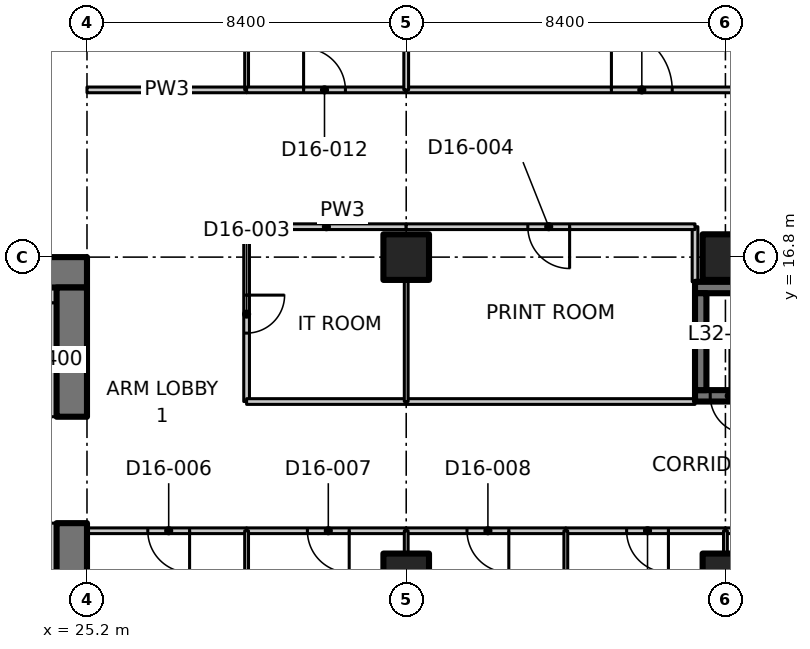
"""IFC4 building model, lengths in metres.
Left out: names, types, materials, properties, quantities, classifications, styles, units other than length and angle.
Written with IfcOpenShell. Run it as: python <this file> out.ifc"""

import sys

from ifc_helpers import new_model, si_unit, direction, frame, frame_2d, origin, origin_2d, place, context, subcontext, project, spatial, polyline, rectangle, outline, extrude, element, fill, save


model = new_model("IFC4")
c1 = context("Model", 3, precision=1e-05, world=origin(), true_north=direction((0.0, 1.0)))
c2 = subcontext(c1, "Body", "Model", "MODEL_VIEW")
j1 = project(units=[si_unit("LENGTHUNIT", "METRE"), si_unit("PLANEANGLEUNIT", "RADIAN")], contexts=[c1])
p1 = place(None, origin())
s1 = spatial("IfcSite", under=j1, at=p1, CompositionType="ELEMENT")
p2 = place(p1, origin())
s2 = spatial("IfcBuilding", under=s1, at=p2, CompositionType="ELEMENT")
p3 = place(p2, frame((0.0, 0.0, 131.3)))
s3 = spatial("IfcBuildingStorey", under=s2, at=p3, CompositionType="ELEMENT", Elevation=131.3)
for number, where, z_axis, x_axis in (
    (1, (33.6, 8.4, 0.0), (0.0, 0.0, 1.0), (1.0, 0.0, 0.0)),
    (2, (33.6, 16.8, 0.0), (0.0, 0.0, 1.0), (1.0, 0.0, 0.0)),
    (3, (42.0, 8.4, 0.0), (0.0, 0.0, 1.0), (1.0, 0.0, 0.0)),
    (4, (42.0, 16.8, 0.0), (0.0, 0.0, 1.0), (1.0, 0.0, 0.0)),
):
    element("IfcColumn", number, at=place(p3, frame(where, z_axis=z_axis, x_axis=x_axis)), inside=s3, PredefinedType="COLUMN", context=c2, shape_type="SweptSolid", body=[
        extrude(rectangle(XDim=1.2, YDim=1.2, at=origin_2d()), origin(), (0.0, 0.0, 1.0), 3.35),
    ])
p4 = place(p3, frame((23.8, 16.4, 0.0), z_axis=(0.0, 0.0, 1.0), x_axis=(1.0, 0.0, 0.0)))
e5 = element("IfcWall", 5, at=p4, inside=s3, PredefinedType="SHEAR", context=c2, shape_type="SweptSolid", body=[
    extrude(rectangle(XDim=1.4, YDim=0.8, at=frame_2d((0.7, 0.0))), origin(), (0.0, 0.0, 1.0), 3.35),
])
p5 = place(p3, frame((24.8, 0.8, 0.0), z_axis=(0.0, 0.0, 1.0), x_axis=(0.0, 1.0, 0.0)))
e6 = element("IfcWall", 6, at=p5, inside=s3, PredefinedType="SHEAR", context=c2, shape_type="SweptSolid", body=[
    extrude(rectangle(XDim=9.0, YDim=0.8, at=frame_2d((4.5, 0.0))), origin(), (0.0, 0.0, 1.0), 3.35),
])
p6 = place(p3, frame((24.8, 12.6, 0.0), z_axis=(0.0, 0.0, 1.0), x_axis=(0.0, 1.0, 0.0)))
e7 = element("IfcWall", 7, at=p6, inside=s3, PredefinedType="SHEAR", context=c2, shape_type="SweptSolid", body=[
    extrude(rectangle(XDim=3.4, YDim=0.8, at=frame_2d((1.7, 0.0))), origin(), (0.0, 0.0, 1.0), 3.35),
])
p7 = place(p3, frame((24.2, 12.6, 0.0), z_axis=(0.0, 0.0, 1.0), x_axis=(0.0, 1.0, 0.0)))
e8 = element("IfcWall", 8, at=p7, inside=s3, PredefinedType="PARTITIONING", context=c2, shape_type="SweptSolid", body=[
    extrude(rectangle(XDim=3.0, YDim=0.4, at=frame_2d((1.5, 0.0))), origin(), (0.0, 0.0, 1.0), 3.35),
])
p8 = place(p3, frame((23.8, 15.8, 0.0), z_axis=(0.0, 0.0, 1.0), x_axis=(1.0, 0.0, 0.0)))
e9 = element("IfcWall", 9, at=p8, inside=s3, PredefinedType="PARTITIONING", context=c2, shape_type="SweptSolid", body=[
    extrude(rectangle(XDim=0.6, YDim=0.4, at=frame_2d((0.3, 0.0))), origin(), (0.0, 0.0, 1.0), 3.35),
])
p9 = place(p3, frame((49.4, 13.15, 0.0), z_axis=(0.0, 0.0, 1.0), x_axis=(-1.0, 0.0, 0.0)))
e10 = element("IfcWall", 10, at=p9, inside=s3, PredefinedType="SHEAR", context=c2, shape_type="SweptSolid", body=[
    extrude(rectangle(XDim=8.2, YDim=0.3, at=frame_2d((4.1, 0.0))), origin(), (0.0, 0.0, 1.0), 3.35),
])
p10 = place(p9, frame((6.8, 0.0, 0.0)))
e11 = element("IfcOpeningElement", 11, at=p10, cuts=e10, PredefinedType="OPENING", context=c2, shape_type="SweptSolid", body=[
    extrude(rectangle(XDim=1.0, YDim=2.1, at=frame_2d((0.5, 1.05))), frame((0.0, 0.16, 0.0), z_axis=(0.0, -1.0, 0.0), x_axis=(1.0, 0.0, 0.0)), (0.0, 0.0, 1.0), 0.32),
])
p11 = place(p3, frame((41.2, 16.0, 0.0), z_axis=(0.0, 0.0, 1.0), x_axis=(1.0, 0.0, 0.0)))
e12 = element("IfcWall", 12, at=p11, inside=s3, PredefinedType="SHEAR", context=c2, shape_type="SweptSolid", body=[
    extrude(rectangle(XDim=8.2, YDim=0.3, at=frame_2d((4.1, 0.0))), origin(), (0.0, 0.0, 1.0), 3.35),
])
p12 = place(p3, frame((41.35, 13.3, 0.0), z_axis=(0.0, 0.0, 1.0), x_axis=(0.0, 1.0, 0.0)))
e13 = element("IfcWall", 13, at=p12, inside=s3, PredefinedType="SHEAR", context=c2, shape_type="SweptSolid", body=[
    extrude(rectangle(XDim=2.55, YDim=0.3, at=frame_2d((1.275, 0.0))), origin(), (0.0, 0.0, 1.0), 3.35),
])
p13 = place(p3, frame((24.2, 4.35, 0.0), z_axis=(0.0, 0.0, 1.0), x_axis=(0.0, 1.0, 0.0)))
e14 = element("IfcWall", 14, at=p13, inside=s3, PredefinedType="PARTITIONING", context=c2, shape_type="SweptSolid", body=[
    extrude(rectangle(XDim=5.45, YDim=0.4, at=frame_2d((2.725, 0.0))), origin(), (0.0, 0.0, 1.0), 3.35),
])
p14 = place(p3, frame((25.2, 21.2, 0.0), z_axis=(0.0, 0.0, 1.0), x_axis=(1.0, 0.0, 0.0)))
e15 = element("IfcWall", 15, at=p14, inside=s3, PredefinedType="PARTITIONING", context=c2, shape_type="SweptSolid", body=[
    extrude(rectangle(XDim=4.2, YDim=0.15, at=frame_2d((2.1, 0.0))), origin(), (0.0, 0.0, 1.0), 3.33),
])
p15 = place(p3, frame((29.4, 17.6, 0.0), z_axis=(0.0, 0.0, 1.0), x_axis=(0.0, -1.0, 0.0)))
e16 = element("IfcWall", 16, at=p15, inside=s3, PredefinedType="PARTITIONING", context=c2, shape_type="SweptSolid", body=[
    extrude(rectangle(XDim=4.6, YDim=0.15, at=frame_2d((2.3, 0.0))), origin(), (0.0, 0.0, 1.0), 3.33),
])
p16 = place(p15, frame((1.8, 0.0, 0.0)))
e17 = element("IfcOpeningElement", 17, at=p16, cuts=e16, PredefinedType="OPENING", context=c2, shape_type="SweptSolid", body=[
    extrude(rectangle(XDim=1.0, YDim=2.1, at=frame_2d((0.5, 1.05))), frame((0.0, 0.085, 0.0), z_axis=(0.0, -1.0, 0.0), x_axis=(1.0, 0.0, 0.0)), (0.0, 0.0, 1.0), 0.17),
])
p17 = place(p3, frame((29.4, 9.6, 0.0), z_axis=(0.0, 0.0, 1.0), x_axis=(-1.0, 0.0, 0.0)))
e18 = element("IfcWall", 18, at=p17, inside=s3, PredefinedType="PARTITIONING", context=c2, shape_type="SweptSolid", body=[
    extrude(rectangle(XDim=4.2, YDim=0.15, at=frame_2d((2.1, 0.0))), origin(), (0.0, 0.0, 1.0), 3.33),
])
p18 = place(p17, frame((1.5, 0.0, 0.0)))
e19 = element("IfcOpeningElement", 19, at=p18, cuts=e18, PredefinedType="OPENING", context=c2, shape_type="SweptSolid", body=[
    extrude(rectangle(XDim=1.1, YDim=2.1, at=frame_2d((0.55, 1.05))), frame((0.0, 0.085, 0.0), z_axis=(0.0, -1.0, 0.0), x_axis=(1.0, 0.0, 0.0)), (0.0, 0.0, 1.0), 0.17),
])
p19 = place(p3, frame((29.4, 27.429, 0.0), z_axis=(0.0, 0.0, 1.0), x_axis=(0.0, -1.0, 0.0)))
e20 = element("IfcWall", 20, at=p19, inside=s3, PredefinedType="PARTITIONING", context=c2, shape_type="SweptSolid", body=[
    extrude(outline(polyline([(0.0, 0.0), (6.229, 0.0), (6.229, 3.33), (2.679, 3.33), (2.677, 2.98), (1.781, 2.98), (1.779, 3.33), (0.154, 3.33), (0.0, 3.33), (0.0, 0.0)])), frame((0.0, 0.05, 0.0), z_axis=(0.0, -1.0, 0.0), x_axis=(1.0, 0.0, 0.0)), (0.0, 0.0, 1.0), 0.1),
])
p20 = place(p3, frame((29.4, 13.0, 0.0), z_axis=(0.0, 0.0, 1.0), x_axis=(1.0, 0.0, 0.0)))
e21 = element("IfcWall", 21, at=p20, inside=s3, PredefinedType="PARTITIONING", context=c2, shape_type="SweptSolid", body=[
    extrude(rectangle(XDim=4.2, YDim=0.15, at=frame_2d((2.1, 0.0))), origin(), (0.0, 0.0, 1.0), 3.33),
])
p21 = place(p3, frame((33.6, 13.0, 0.0), z_axis=(0.0, 0.0, 1.0), x_axis=(1.0, 0.0, 0.0)))
e22 = element("IfcWall", 22, at=p21, inside=s3, PredefinedType="PARTITIONING", context=c2, shape_type="SweptSolid", body=[
    extrude(rectangle(XDim=7.6, YDim=0.15, at=frame_2d((3.8, 0.0))), origin(), (0.0, 0.0, 1.0), 3.33),
])
p22 = place(p3, frame((33.6, 9.6, 0.0), z_axis=(0.0, 0.0, 1.0), x_axis=(-1.0, 0.0, 0.0)))
e23 = element("IfcWall", 23, at=p22, inside=s3, PredefinedType="PARTITIONING", context=c2, shape_type="SweptSolid", body=[
    extrude(rectangle(XDim=4.2, YDim=0.15, at=frame_2d((2.1, 0.0))), origin(), (0.0, 0.0, 1.0), 3.33),
])
p23 = place(p22, frame((1.5, 0.0, 0.0)))
e24 = element("IfcOpeningElement", 24, at=p23, cuts=e23, PredefinedType="OPENING", context=c2, shape_type="SweptSolid", body=[
    extrude(rectangle(XDim=1.1, YDim=2.1, at=frame_2d((0.55, 1.05))), frame((0.0, 0.085, 0.0), z_axis=(0.0, -1.0, 0.0), x_axis=(1.0, 0.0, 0.0)), (0.0, 0.0, 1.0), 0.17),
])
p24 = place(p3, frame((37.8, 9.6, 0.0), z_axis=(0.0, 0.0, 1.0), x_axis=(-1.0, 0.0, 0.0)))
e25 = element("IfcWall", 25, at=p24, inside=s3, PredefinedType="PARTITIONING", context=c2, shape_type="SweptSolid", body=[
    extrude(rectangle(XDim=4.2, YDim=0.15, at=frame_2d((2.1, 0.0))), origin(), (0.0, 0.0, 1.0), 3.33),
])
p25 = place(p24, frame((1.5, 0.0, 0.0)))
e26 = element("IfcOpeningElement", 26, at=p25, cuts=e25, PredefinedType="OPENING", context=c2, shape_type="SweptSolid", body=[
    extrude(rectangle(XDim=1.1, YDim=2.1, at=frame_2d((0.55, 1.05))), frame((0.0, 0.085, 0.0), z_axis=(0.0, -1.0, 0.0), x_axis=(1.0, 0.0, 0.0)), (0.0, 0.0, 1.0), 0.17),
])
p26 = place(p3, frame((42.0, 9.6, 0.0), z_axis=(0.0, 0.0, 1.0), x_axis=(-1.0, 0.0, 0.0)))
e27 = element("IfcWall", 27, at=p26, inside=s3, PredefinedType="PARTITIONING", context=c2, shape_type="SweptSolid", body=[
    extrude(rectangle(XDim=4.2, YDim=0.15, at=frame_2d((2.1, 0.0))), origin(), (0.0, 0.0, 1.0), 3.33),
])
p27 = place(p26, frame((1.5, 0.0, 0.0)))
e28 = element("IfcOpeningElement", 28, at=p27, cuts=e27, PredefinedType="OPENING", context=c2, shape_type="SweptSolid", body=[
    extrude(rectangle(XDim=1.1, YDim=2.1, at=frame_2d((0.55, 1.05))), frame((0.0, 0.085, 0.0), z_axis=(0.0, -1.0, 0.0), x_axis=(1.0, 0.0, 0.0)), (0.0, 0.0, 1.0), 0.17),
])
p28 = place(p3, frame((50.4, 9.6, 0.0), z_axis=(0.0, 0.0, 1.0), x_axis=(-1.0, 0.0, 0.0)))
e29 = element("IfcWall", 29, at=p28, inside=s3, PredefinedType="PARTITIONING", context=c2, shape_type="SweptSolid", body=[
    extrude(rectangle(XDim=8.4, YDim=0.15, at=frame_2d((4.2, 0.0))), origin(), (0.0, 0.0, 1.0), 3.33),
])
p29 = place(p28, frame((3.3, 0.0, 0.0)))
e30 = element("IfcOpeningElement", 30, at=p29, cuts=e29, PredefinedType="OPENING", context=c2, shape_type="SweptSolid", body=[
    extrude(rectangle(XDim=1.6, YDim=2.1, at=frame_2d((0.8, 1.05))), frame((0.0, 0.085, 0.0), z_axis=(0.0, -1.0, 0.0), x_axis=(1.0, 0.0, 0.0)), (0.0, 0.0, 1.0), 0.17),
])
p30 = place(p3, frame((33.6, 17.6, 0.0), z_axis=(0.0, 0.0, 1.0), x_axis=(-1.0, 0.0, 0.0)))
e31 = element("IfcWall", 31, at=p30, inside=s3, PredefinedType="PARTITIONING", context=c2, shape_type="SweptSolid", body=[
    extrude(rectangle(XDim=4.2, YDim=0.15, at=frame_2d((2.1, 0.0))), origin(), (0.0, 0.0, 1.0), 3.33),
])
p31 = place(p3, frame((41.2, 16.15, 0.0), z_axis=(0.0, 0.0, 1.0), x_axis=(0.0, 1.0, 0.0)))
e32 = element("IfcWall", 32, at=p31, inside=s3, PredefinedType="PARTITIONING", context=c2, shape_type="SweptSolid", body=[
    extrude(rectangle(XDim=1.45, YDim=0.15, at=frame_2d((0.725, 0.0))), origin(), (0.0, 0.0, 1.0), 3.33),
])
p32 = place(p3, frame((41.2, 17.6, 0.0), z_axis=(0.0, 0.0, 1.0), x_axis=(-1.0, 0.0, 0.0)))
e33 = element("IfcWall", 33, at=p32, inside=s3, PredefinedType="PARTITIONING", context=c2, shape_type="SweptSolid", body=[
    extrude(rectangle(XDim=7.6, YDim=0.15, at=frame_2d((3.8, 0.0))), origin(), (0.0, 0.0, 1.0), 3.33),
])
p33 = place(p32, frame((3.3, 0.0, 0.0)))
e34 = element("IfcOpeningElement", 34, at=p33, cuts=e33, PredefinedType="OPENING", context=c2, shape_type="SweptSolid", body=[
    extrude(rectangle(XDim=1.1, YDim=2.1, at=frame_2d((0.55, 1.05))), frame((0.0, 0.085, 0.0), z_axis=(0.0, -1.0, 0.0), x_axis=(1.0, 0.0, 0.0)), (0.0, 0.0, 1.0), 0.17),
])
p34 = place(p3, frame((29.4, 21.2, 0.0), z_axis=(0.0, 0.0, 1.0), x_axis=(1.0, 0.0, 0.0)))
e35 = element("IfcWall", 35, at=p34, inside=s3, PredefinedType="PARTITIONING", context=c2, shape_type="SweptSolid", body=[
    extrude(rectangle(XDim=4.2, YDim=0.15, at=frame_2d((2.1, 0.0))), origin(), (0.0, 0.0, 1.0), 3.33),
])
p35 = place(p34, frame((1.5, 0.0, 0.0)))
e36 = element("IfcOpeningElement", 36, at=p35, cuts=e35, PredefinedType="OPENING", context=c2, shape_type="SweptSolid", body=[
    extrude(rectangle(XDim=1.1, YDim=2.1, at=frame_2d((0.55, 1.05))), frame((0.0, 0.085, 0.0), z_axis=(0.0, -1.0, 0.0), x_axis=(1.0, 0.0, 0.0)), (0.0, 0.0, 1.0), 0.17),
])
p36 = place(p3, frame((33.6, 21.2, 0.0), z_axis=(0.0, 0.0, 1.0), x_axis=(1.0, 0.0, 0.0)))
e37 = element("IfcWall", 37, at=p36, inside=s3, PredefinedType="PARTITIONING", context=c2, shape_type="SweptSolid", body=[
    extrude(rectangle(XDim=12.6, YDim=0.15, at=frame_2d((6.3, 0.0))), origin(), (0.0, 0.0, 1.0), 3.33),
])
p37 = place(p36, frame((5.4, 0.0, 0.0)))
e38 = element("IfcOpeningElement", 38, at=p37, cuts=e37, PredefinedType="OPENING", context=c2, shape_type="SweptSolid", body=[
    extrude(rectangle(XDim=1.6, YDim=2.1, at=frame_2d((0.8, 1.05))), frame((0.0, 0.085, 0.0), z_axis=(0.0, -1.0, 0.0), x_axis=(1.0, 0.0, 0.0)), (0.0, 0.0, 1.0), 0.17),
])
p38 = place(p3, frame((33.6, 16.18, 0.0), z_axis=(0.0, 0.0, 1.0), x_axis=(0.0, -1.0, 0.0)))
e39 = element("IfcWall", 39, at=p38, inside=s3, PredefinedType="PARTITIONING", context=c2, shape_type="SweptSolid", body=[
    extrude(rectangle(XDim=3.18, YDim=0.1, at=frame_2d((1.59, 0.0))), origin(), (0.0, 0.0, 1.0), 3.33),
])
p39 = place(p3, frame((29.4, 9.6, 0.0), z_axis=(0.0, 0.0, 1.0), x_axis=(0.0, -1.0, 0.0)))
e40 = element("IfcWall", 40, at=p39, inside=s3, PredefinedType="PARTITIONING", context=c2, shape_type="SweptSolid", body=[
    extrude(outline(polyline([(0.0, 0.0), (10.965, 0.0), (10.965, 3.33), (10.7, 3.33), (10.05, 3.33), (10.048, 2.98), (9.152, 2.98), (9.15, 3.33), (0.0, 3.33), (0.0, 0.0)])), frame((0.0, 0.05, 0.0), z_axis=(0.0, -1.0, 0.0), x_axis=(1.0, 0.0, 0.0)), (0.0, 0.0, 1.0), 0.1),
])
p40 = place(p3, frame((33.6, 9.6, 0.0), z_axis=(0.0, 0.0, 1.0), x_axis=(0.0, -1.0, 0.0)))
e41 = element("IfcWall", 41, at=p40, inside=s3, PredefinedType="PARTITIONING", context=c2, shape_type="SweptSolid", body=[
    extrude(rectangle(XDim=0.58, YDim=0.1, at=frame_2d((0.29, 0.0))), origin(), (0.0, 0.0, 1.0), 3.33),
])
p41 = place(p3, frame((37.8, 9.6, 0.0), z_axis=(0.0, 0.0, 1.0), x_axis=(0.0, -1.0, 0.0)))
e42 = element("IfcWall", 42, at=p41, inside=s3, PredefinedType="PARTITIONING", context=c2, shape_type="SweptSolid", body=[
    extrude(outline(polyline([(0.0, 0.0), (10.965, 0.0), (10.965, 3.33), (10.7, 3.33), (10.05, 3.33), (10.048, 2.98), (9.152, 2.98), (9.15, 3.33), (0.0, 3.33), (0.0, 0.0)])), frame((0.0, 0.05, 0.0), z_axis=(0.0, -1.0, 0.0), x_axis=(1.0, 0.0, 0.0)), (0.0, 0.0, 1.0), 0.1),
])
p42 = place(p3, frame((42.0, 9.6, 0.0), z_axis=(0.0, 0.0, 1.0), x_axis=(0.0, -1.0, 0.0)))
e43 = element("IfcWall", 43, at=p42, inside=s3, PredefinedType="PARTITIONING", context=c2, shape_type="SweptSolid", body=[
    extrude(rectangle(XDim=0.58, YDim=0.1, at=frame_2d((0.29, 0.0))), origin(), (0.0, 0.0, 1.0), 3.33),
])
p43 = place(p3, frame((33.6, 24.68, 0.0), z_axis=(0.0, 0.0, 1.0), x_axis=(0.0, -1.0, 0.0)))
e44 = element("IfcWall", 44, at=p43, inside=s3, PredefinedType="PARTITIONING", context=c2, shape_type="SweptSolid", body=[
    extrude(rectangle(XDim=3.48, YDim=0.125, at=frame_2d((1.74, 0.0))), origin(), (0.0, 0.0, 1.0), 3.33),
])
p44 = place(p10, origin())
e45 = element("IfcDoor", 45, at=p44, inside=s3, OperationType="SINGLE_SWING_RIGHT", PredefinedType="DOOR", context=c2, shape_type="SweptSolid", body=[
    extrude(rectangle(XDim=1.0, YDim=2.1, at=frame_2d((0.5, 1.05))), frame((0.0, 0.025, 0.0), z_axis=(0.0, -1.0, 0.0), x_axis=(1.0, 0.0, 0.0)), (0.0, 0.0, 1.0), 0.05),
])
fill(e11, e45)
p45 = place(p16, origin())
e46 = element("IfcDoor", 46, at=p45, inside=s3, OperationType="SINGLE_SWING_LEFT", PredefinedType="DOOR", context=c2, shape_type="SweptSolid", body=[
    extrude(rectangle(XDim=1.0, YDim=2.1, at=frame_2d((0.5, 1.05))), frame((0.0, 0.025, 0.0), z_axis=(0.0, -1.0, 0.0), x_axis=(1.0, 0.0, 0.0)), (0.0, 0.0, 1.0), 0.05),
])
fill(e17, e46)
p46 = place(p33, origin())
e47 = element("IfcDoor", 47, at=p46, inside=s3, OperationType="SINGLE_SWING_LEFT", PredefinedType="DOOR", context=c2, shape_type="SweptSolid", body=[
    extrude(rectangle(XDim=1.1, YDim=2.1, at=frame_2d((0.55, 1.05))), frame((0.0, 0.025, 0.0), z_axis=(0.0, -1.0, 0.0), x_axis=(1.0, 0.0, 0.0)), (0.0, 0.0, 1.0), 0.05),
])
fill(e34, e47)
p47 = place(p18, origin())
e48 = element("IfcDoor", 48, at=p47, inside=s3, OperationType="SINGLE_SWING_LEFT", PredefinedType="DOOR", context=c2, shape_type="SweptSolid", body=[
    extrude(rectangle(XDim=1.1, YDim=2.1, at=frame_2d((0.55, 1.05))), frame((0.0, 0.025, 0.0), z_axis=(0.0, -1.0, 0.0), x_axis=(1.0, 0.0, 0.0)), (0.0, 0.0, 1.0), 0.05),
])
fill(e19, e48)
p48 = place(p23, origin())
e49 = element("IfcDoor", 49, at=p48, inside=s3, OperationType="SINGLE_SWING_LEFT", PredefinedType="DOOR", context=c2, shape_type="SweptSolid", body=[
    extrude(rectangle(XDim=1.1, YDim=2.1, at=frame_2d((0.55, 1.05))), frame((0.0, 0.025, 0.0), z_axis=(0.0, -1.0, 0.0), x_axis=(1.0, 0.0, 0.0)), (0.0, 0.0, 1.0), 0.05),
])
fill(e24, e49)
p49 = place(p25, origin())
e50 = element("IfcDoor", 50, at=p49, inside=s3, OperationType="SINGLE_SWING_LEFT", PredefinedType="DOOR", context=c2, shape_type="SweptSolid", body=[
    extrude(rectangle(XDim=1.1, YDim=2.1, at=frame_2d((0.55, 1.05))), frame((0.0, 0.025, 0.0), z_axis=(0.0, -1.0, 0.0), x_axis=(1.0, 0.0, 0.0)), (0.0, 0.0, 1.0), 0.05),
])
fill(e26, e50)
p50 = place(p27, origin())
e51 = element("IfcDoor", 51, at=p50, inside=s3, OperationType="SINGLE_SWING_LEFT", PredefinedType="DOOR", context=c2, shape_type="SweptSolid", body=[
    extrude(rectangle(XDim=1.1, YDim=2.1, at=frame_2d((0.55, 1.05))), frame((0.0, 0.025, 0.0), z_axis=(0.0, -1.0, 0.0), x_axis=(1.0, 0.0, 0.0)), (0.0, 0.0, 1.0), 0.05),
])
fill(e28, e51)
p51 = place(p35, origin())
e52 = element("IfcDoor", 52, at=p51, inside=s3, OperationType="SINGLE_SWING_LEFT", PredefinedType="DOOR", context=c2, shape_type="SweptSolid", body=[
    extrude(rectangle(XDim=1.1, YDim=2.1, at=frame_2d((0.55, 1.05))), frame((0.0, 0.025, 0.0), z_axis=(0.0, -1.0, 0.0), x_axis=(1.0, 0.0, 0.0)), (0.0, 0.0, 1.0), 0.05),
])
fill(e36, e52)
p52 = place(p37, origin())
e53 = element("IfcDoor", 53, at=p52, inside=s3, OperationType="DOUBLE_DOOR_SINGLE_SWING", PredefinedType="DOOR", context=c2, shape_type="SweptSolid", body=[
    extrude(rectangle(XDim=1.6, YDim=2.1, at=frame_2d((0.8, 1.05))), frame((0.0, 0.025, 0.0), z_axis=(0.0, -1.0, 0.0), x_axis=(1.0, 0.0, 0.0)), (0.0, 0.0, 1.0), 0.05),
])
fill(e38, e53)
save(model, sys.argv[1])
